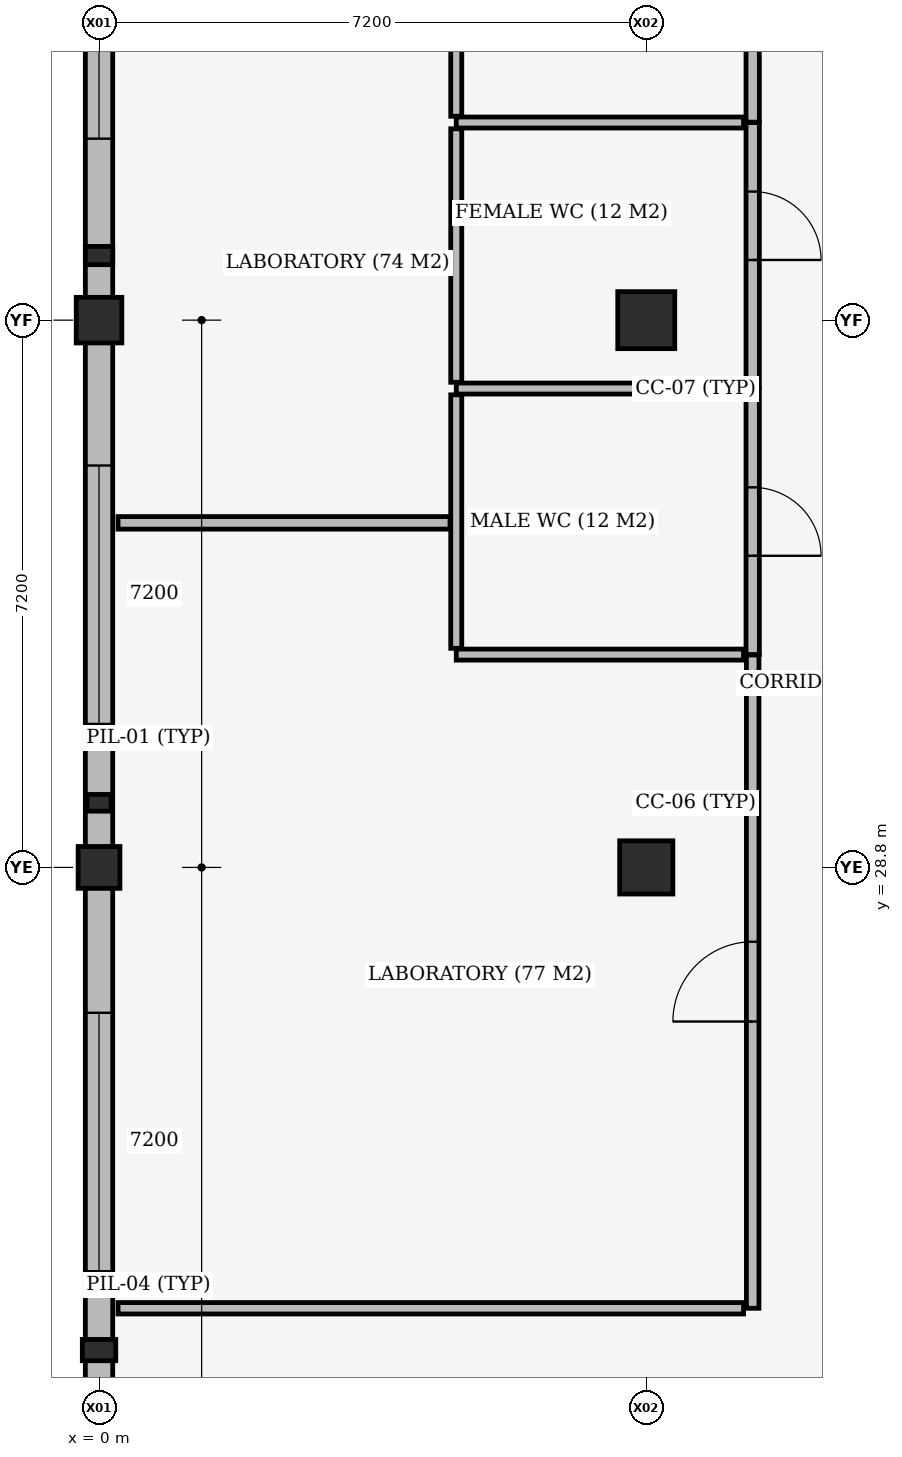
"""IFC4 building model, lengths in metres.
Left out: names, types, materials, properties, quantities, classifications, styles, units other than length and angle.
Written with IfcOpenShell. Run it as: python <this file> out.ifc"""

import sys

from ifc_helpers import new_model, si_unit, direction, frame, frame_2d, origin, origin_2d, place, context, subcontext, project, spatial, rectangle, extrude, element, fill, save


model = new_model("IFC4")
c1 = context("Model", 3, precision=1e-05, world=origin(), true_north=direction((0.0, 1.0)))
c2 = subcontext(c1, "Body", "Model", "MODEL_VIEW")
j1 = project(units=[si_unit("LENGTHUNIT", "METRE"), si_unit("PLANEANGLEUNIT", "RADIAN")], contexts=[c1])
p1 = place(None, origin())
s1 = spatial("IfcSite", under=j1, at=p1, CompositionType="ELEMENT")
p2 = place(p1, origin())
s2 = spatial("IfcBuilding", under=s1, at=p2, CompositionType="ELEMENT")
p3 = place(p2, frame((0.0, 0.0, 5.4)))
s3 = spatial("IfcBuildingStorey", under=s2, at=p3, CompositionType="ELEMENT", Elevation=5.4)
p4 = place(p3, frame((0.0, 28.8, 0.0), z_axis=(0.0, 0.0, 1.0), x_axis=(1.0, 0.0, 0.0)))
e1 = element("IfcColumn", 1, at=p4, inside=s3, PredefinedType="COLUMN", context=c2, shape_type="SweptSolid", body=[
    extrude(rectangle(XDim=0.55, YDim=0.55, at=origin_2d()), origin(), (0.0, 0.0, 1.0), 3.89),
])
p5 = place(p3, frame((0.0, 36.0, 0.0), z_axis=(0.0, 0.0, 1.0), x_axis=(1.0, 0.0, 0.0)))
e2 = element("IfcColumn", 2, at=p5, inside=s3, PredefinedType="COLUMN", context=c2, shape_type="SweptSolid", body=[
    extrude(rectangle(XDim=0.6, YDim=0.6, at=origin_2d()), origin(), (0.0, 0.0, 1.0), 3.89),
])
p6 = place(p3, frame((7.2, 28.8, 0.0), z_axis=(0.0, 0.0, 1.0), x_axis=(1.0, 0.0, 0.0)))
e3 = element("IfcColumn", 3, at=p6, inside=s3, PredefinedType="COLUMN", context=c2, shape_type="SweptSolid", body=[
    extrude(rectangle(XDim=0.7, YDim=0.7, at=origin_2d()), origin(), (0.0, 0.0, 1.0), 3.89),
])
p7 = place(p3, frame((7.2, 36.0, 0.0), z_axis=(0.0, 0.0, 1.0), x_axis=(1.0, 0.0, 0.0)))
e4 = element("IfcColumn", 4, at=p7, inside=s3, PredefinedType="COLUMN", context=c2, shape_type="SweptSolid", body=[
    extrude(rectangle(XDim=0.75, YDim=0.75, at=origin_2d()), origin(), (0.0, 0.0, 1.0), 3.89),
])
p8 = place(p3, frame((0.0, 22.45, 0.0), z_axis=(0.0, 0.0, 1.0), x_axis=(1.0, 0.0, 0.0)))
e5 = element("IfcColumn", 5, at=p8, inside=s3, PredefinedType="PILASTER", context=c2, shape_type="SweptSolid", body=[
    extrude(rectangle(XDim=0.44, YDim=0.28, at=origin_2d()), origin(), (0.0, 0.0, 1.0), 3.89),
])
p9 = place(p3, frame((0.0, 29.65, 0.0), z_axis=(0.0, 0.0, 1.0), x_axis=(1.0, 0.0, 0.0)))
e6 = element("IfcColumn", 6, at=p9, inside=s3, PredefinedType="PILASTER", context=c2, shape_type="SweptSolid", body=[
    extrude(rectangle(XDim=0.32, YDim=0.22, at=origin_2d()), origin(), (0.0, 0.0, 1.0), 3.89),
])
p10 = place(p3, frame((0.0, 36.85, 0.0), z_axis=(0.0, 0.0, 1.0), x_axis=(1.0, 0.0, 0.0)))
e7 = element("IfcColumn", 7, at=p10, inside=s3, PredefinedType="PILASTER", context=c2, shape_type="SweptSolid", body=[
    extrude(rectangle(XDim=0.36, YDim=0.24, at=origin_2d()), origin(), (0.0, 0.0, 1.0), 3.89),
])
p11 = place(p3, frame((0.0, 21.842, 0.0), z_axis=(0.0, 0.0, 1.0), x_axis=(0.0, 1.0, 0.0)))
e8 = element("IfcWall", 8, at=p11, inside=s3, PredefinedType="STANDARD", context=c2, shape_type="SweptSolid", body=[
    extrude(rectangle(XDim=6.691, YDim=0.36, at=frame_2d((3.345, 0.0))), origin(), (0.0, 0.0, 1.0), 3.21),
])
p12 = place(p11, frame((1.646, 0.0, 0.9)))
e9 = element("IfcOpeningElement", 9, at=p12, cuts=e8, PredefinedType="OPENING", context=c2, shape_type="SweptSolid", body=[
    extrude(rectangle(XDim=3.4, YDim=1.5, at=frame_2d((1.7, 0.75))), frame((0.0, 0.19, 0.0), z_axis=(0.0, -1.0, 0.0), x_axis=(1.0, 0.0, 0.0)), (0.0, 0.0, 1.0), 0.38),
])
p13 = place(p3, frame((0.0, 29.067, 0.0), z_axis=(0.0, 0.0, 1.0), x_axis=(0.0, 1.0, 0.0)))
e10 = element("IfcWall", 10, at=p13, inside=s3, PredefinedType="STANDARD", context=c2, shape_type="SweptSolid", body=[
    extrude(rectangle(XDim=6.641, YDim=0.36, at=frame_2d((3.321, 0.0))), origin(), (0.0, 0.0, 1.0), 3.15),
])
p14 = place(p13, frame((1.621, 0.0, 0.9)))
e11 = element("IfcOpeningElement", 11, at=p14, cuts=e10, PredefinedType="OPENING", context=c2, shape_type="SweptSolid", body=[
    extrude(rectangle(XDim=3.4, YDim=1.5, at=frame_2d((1.7, 0.75))), frame((0.0, 0.19, 0.0), z_axis=(0.0, -1.0, 0.0), x_axis=(1.0, 0.0, 0.0)), (0.0, 0.0, 1.0), 0.38),
])
p15 = place(p3, frame((0.0, 36.292, 0.0), z_axis=(0.0, 0.0, 1.0), x_axis=(0.0, 1.0, 0.0)))
e12 = element("IfcWall", 12, at=p15, inside=s3, PredefinedType="STANDARD", context=c2, shape_type="SweptSolid", body=[
    extrude(rectangle(XDim=6.591, YDim=0.36, at=frame_2d((3.295, 0.0))), origin(), (0.0, 0.0, 1.0), 3.37),
])
p16 = place(p15, frame((2.095, 0.0, 0.9)))
e13 = element("IfcOpeningElement", 13, at=p16, cuts=e12, PredefinedType="OPENING", context=c2, shape_type="SweptSolid", body=[
    extrude(rectangle(XDim=2.4, YDim=2.2, at=frame_2d((1.2, 1.1))), frame((0.0, 0.19, 0.0), z_axis=(0.0, -1.0, 0.0), x_axis=(1.0, 0.0, 0.0)), (0.0, 0.0, 1.0), 0.38),
])
p17 = place(p3, frame((8.6, 31.6, 0.0), z_axis=(0.0, 0.0, 1.0), x_axis=(0.0, 1.0, 0.0)))
e14 = element("IfcWall", 14, at=p17, inside=s3, PredefinedType="PLUMBINGWALL", context=c2, shape_type="SweptSolid", body=[
    extrude(rectangle(XDim=3.5, YDim=0.175, at=frame_2d((1.75, 0.0))), origin(), (0.0, 0.0, 1.0), 3.89),
])
p18 = place(p17, frame((1.3, 0.0, 0.0)))
e15 = element("IfcOpeningElement", 15, at=p18, cuts=e14, PredefinedType="OPENING", context=c2, shape_type="SweptSolid", body=[
    extrude(rectangle(XDim=0.9, YDim=2.1, at=frame_2d((0.45, 1.05))), frame((0.0, 0.097, 0.0), z_axis=(0.0, -1.0, 0.0), x_axis=(1.0, 0.0, 0.0)), (0.0, 0.0, 1.0), 0.195),
])
for number, where, z_axis, x_axis in (
    (16, (4.7, 31.6, 0.0), (0.0, 0.0, 1.0), (1.0, 0.0, 0.0)),
    (17, (4.7, 35.1, 0.0), (0.0, 0.0, 1.0), (1.0, 0.0, 0.0)),
):
    element("IfcWall", number, at=place(p3, frame(where, z_axis=z_axis, x_axis=x_axis)), inside=s3, PredefinedType="PLUMBINGWALL", context=c2, shape_type="SweptSolid", body=[
        extrude(rectangle(XDim=3.78, YDim=0.145, at=frame_2d((1.89, 0.0))), origin(), (0.0, 0.0, 1.0), 3.37),
    ])
p19 = place(p3, frame((4.7, 31.683, 0.0), z_axis=(0.0, 0.0, 1.0), x_axis=(0.0, 1.0, 0.0)))
e18 = element("IfcWall", 18, at=p19, inside=s3, PredefinedType="PLUMBINGWALL", context=c2, shape_type="SweptSolid", body=[
    extrude(rectangle(XDim=3.335, YDim=0.145, at=frame_2d((1.667, 0.0))), origin(), (0.0, 0.0, 1.0), 3.62),
])
p20 = place(p3, frame((8.6, 35.105, 0.0), z_axis=(0.0, 0.0, 1.0), x_axis=(0.0, 1.0, 0.0)))
e19 = element("IfcWall", 19, at=p20, inside=s3, PredefinedType="PLUMBINGWALL", context=c2, shape_type="SweptSolid", body=[
    extrude(rectangle(XDim=3.495, YDim=0.175, at=frame_2d((1.748, 0.0))), origin(), (0.0, 0.0, 1.0), 3.15),
])
p21 = place(p20, frame((1.687, 0.0, 0.0)))
e20 = element("IfcOpeningElement", 20, at=p21, cuts=e19, PredefinedType="OPENING", context=c2, shape_type="SweptSolid", body=[
    extrude(rectangle(XDim=0.9, YDim=2.1, at=frame_2d((0.45, 1.05))), frame((0.0, 0.097, 0.0), z_axis=(0.0, -1.0, 0.0), x_axis=(1.0, 0.0, 0.0)), (0.0, 0.0, 1.0), 0.195),
])
p22 = place(p3, frame((4.7, 38.6, 0.0), z_axis=(0.0, 0.0, 1.0), x_axis=(1.0, 0.0, 0.0)))
e21 = element("IfcWall", 21, at=p22, inside=s3, PredefinedType="PLUMBINGWALL", context=c2, shape_type="SweptSolid", body=[
    extrude(rectangle(XDim=3.78, YDim=0.145, at=frame_2d((1.89, 0.0))), origin(), (0.0, 0.0, 1.0), 3.31),
])
p23 = place(p3, frame((4.7, 35.183, 0.0), z_axis=(0.0, 0.0, 1.0), x_axis=(0.0, 1.0, 0.0)))
e22 = element("IfcWall", 22, at=p23, inside=s3, PredefinedType="PLUMBINGWALL", context=c2, shape_type="SweptSolid", body=[
    extrude(rectangle(XDim=3.335, YDim=0.145, at=frame_2d((1.667, 0.0))), origin(), (0.0, 0.0, 1.0), 3.21),
])
p24 = place(p3, frame((8.6, 38.605, 0.0), z_axis=(0.0, 0.0, 1.0), x_axis=(0.0, 1.0, 0.0)))
e23 = element("IfcWall", 23, at=p24, inside=s3, PredefinedType="PLUMBINGWALL", context=c2, shape_type="SweptSolid", body=[
    extrude(rectangle(XDim=2.995, YDim=0.175, at=frame_2d((1.498, 0.0))), origin(), (0.0, 0.0, 1.0), 3.89),
])
p25 = place(p24, frame((1.038, 0.0, 0.0)))
e24 = element("IfcOpeningElement", 24, at=p25, cuts=e23, PredefinedType="OPENING", context=c2, shape_type="SweptSolid", body=[
    extrude(rectangle(XDim=0.92, YDim=2.1, at=frame_2d((0.46, 1.05))), frame((0.0, 0.097, 0.0), z_axis=(0.0, -1.0, 0.0), x_axis=(1.0, 0.0, 0.0)), (0.0, 0.0, 1.0), 0.195),
])
p26 = place(p3, frame((4.7, 38.683, 0.0), z_axis=(0.0, 0.0, 1.0), x_axis=(0.0, 1.0, 0.0)))
e25 = element("IfcWall", 25, at=p26, inside=s3, PredefinedType="PLUMBINGWALL", context=c2, shape_type="SweptSolid", body=[
    extrude(rectangle(XDim=2.835, YDim=0.145, at=frame_2d((1.417, 0.0))), origin(), (0.0, 0.0, 1.0), 3.53),
])
p27 = place(p3, frame((0.25, 23.0, 0.0), z_axis=(0.0, 0.0, 1.0), x_axis=(1.0, 0.0, 0.0)))
e26 = element("IfcWall", 26, at=p27, inside=s3, PredefinedType="PARTITIONING", context=c2, shape_type="SweptSolid", body=[
    extrude(rectangle(XDim=8.23, YDim=0.15, at=frame_2d((4.115, 0.0))), origin(), (0.0, 0.0, 1.0), 3.15),
])
p28 = place(p3, frame((8.6, 23.0, 0.0), z_axis=(0.0, 0.0, 1.0), x_axis=(0.0, 1.0, 0.0)))
e27 = element("IfcWall", 27, at=p28, inside=s3, PredefinedType="PARTITIONING", context=c2, shape_type="SweptSolid", body=[
    extrude(rectangle(XDim=8.595, YDim=0.165, at=frame_2d((4.297, 0.0))), origin(), (0.0, 0.0, 1.0), 3.21),
])
p29 = place(p28, frame((3.772, 0.0, 0.0)))
e28 = element("IfcOpeningElement", 28, at=p29, cuts=e27, PredefinedType="OPENING", context=c2, shape_type="SweptSolid", body=[
    extrude(rectangle(XDim=1.05, YDim=2.2, at=frame_2d((0.525, 1.1))), frame((0.0, 0.093, 0.0), z_axis=(0.0, -1.0, 0.0), x_axis=(1.0, 0.0, 0.0)), (0.0, 0.0, 1.0), 0.185),
])
p30 = place(p3, frame((0.25, 33.333, 0.0), z_axis=(0.0, 0.0, 1.0), x_axis=(1.0, 0.0, 0.0)))
e29 = element("IfcWall", 29, at=p30, inside=s3, PredefinedType="PARTITIONING", context=c2, shape_type="SweptSolid", body=[
    extrude(rectangle(XDim=4.367, YDim=0.165, at=frame_2d((2.184, 0.0))), origin(), (0.0, 0.0, 1.0), 3.65),
])
p31 = place(p12, origin())
e30 = element("IfcWindow", 30, at=p31, inside=s3, PartitioningType="DOUBLE_PANEL_VERTICAL", PredefinedType="WINDOW", context=c2, shape_type="SweptSolid", body=[
    extrude(rectangle(XDim=3.4, YDim=1.5, at=frame_2d((1.7, 0.75))), frame((0.0, 0.03, 0.0), z_axis=(0.0, -1.0, 0.0), x_axis=(1.0, 0.0, 0.0)), (0.0, 0.0, 1.0), 0.06),
])
fill(e9, e30)
p32 = place(p14, origin())
e31 = element("IfcWindow", 31, at=p32, inside=s3, PartitioningType="DOUBLE_PANEL_VERTICAL", PredefinedType="WINDOW", context=c2, shape_type="SweptSolid", body=[
    extrude(rectangle(XDim=3.4, YDim=1.5, at=frame_2d((1.7, 0.75))), frame((0.0, 0.03, 0.0), z_axis=(0.0, -1.0, 0.0), x_axis=(1.0, 0.0, 0.0)), (0.0, 0.0, 1.0), 0.06),
])
fill(e11, e31)
p33 = place(p16, origin())
e32 = element("IfcWindow", 32, at=p33, inside=s3, PartitioningType="DOUBLE_PANEL_VERTICAL", PredefinedType="WINDOW", context=c2, shape_type="SweptSolid", body=[
    extrude(rectangle(XDim=2.4, YDim=2.2, at=frame_2d((1.2, 1.1))), frame((0.0, 0.03, 0.0), z_axis=(0.0, -1.0, 0.0), x_axis=(1.0, 0.0, 0.0)), (0.0, 0.0, 1.0), 0.06),
])
fill(e13, e32)
p34 = place(p18, origin())
e33 = element("IfcDoor", 33, at=p34, inside=s3, OperationType="SINGLE_SWING_RIGHT", PredefinedType="DOOR", context=c2, shape_type="SweptSolid", body=[
    extrude(rectangle(XDim=0.9, YDim=2.1, at=frame_2d((0.45, 1.05))), frame((0.0, 0.025, 0.0), z_axis=(0.0, -1.0, 0.0), x_axis=(1.0, 0.0, 0.0)), (0.0, 0.0, 1.0), 0.05),
])
fill(e15, e33)
p35 = place(p21, origin())
e34 = element("IfcDoor", 34, at=p35, inside=s3, OperationType="SINGLE_SWING_RIGHT", PredefinedType="DOOR", context=c2, shape_type="SweptSolid", body=[
    extrude(rectangle(XDim=0.9, YDim=2.1, at=frame_2d((0.45, 1.05))), frame((0.0, 0.025, 0.0), z_axis=(0.0, -1.0, 0.0), x_axis=(1.0, 0.0, 0.0)), (0.0, 0.0, 1.0), 0.05),
])
fill(e20, e34)
p36 = place(p29, origin())
e35 = element("IfcDoor", 35, at=p36, inside=s3, OperationType="SINGLE_SWING_LEFT", PredefinedType="DOOR", context=c2, shape_type="SweptSolid", body=[
    extrude(rectangle(XDim=1.05, YDim=2.2, at=frame_2d((0.525, 1.1))), frame((0.0, 0.025, 0.0), z_axis=(0.0, -1.0, 0.0), x_axis=(1.0, 0.0, 0.0)), (0.0, 0.0, 1.0), 0.05),
])
fill(e28, e35)
save(model, sys.argv[1])
